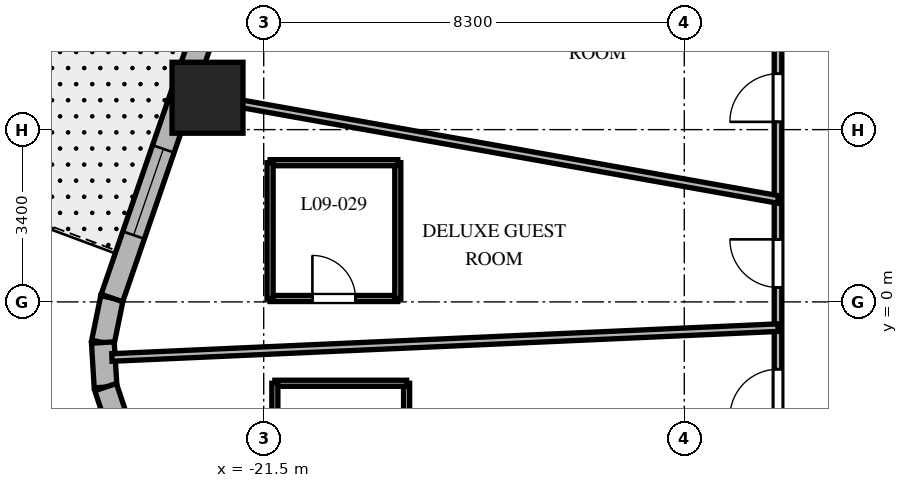
"""IFC4 building model, lengths in metres.
Left out: names, types, materials, properties, quantities, classifications, styles, units other than length and angle.
Written with IfcOpenShell. Run it as: python <this file> out.ifc"""

import sys

from ifc_helpers import new_model, si_unit, direction, frame, frame_2d, origin, origin_2d, place, context, subcontext, project, spatial, rectangle, extrude, element, fill, save


model = new_model("IFC4")
c1 = context("Model", 3, precision=1e-05, world=origin(), true_north=direction((0.0, 1.0)))
c2 = subcontext(c1, "Body", "Model", "MODEL_VIEW")
j1 = project(units=[si_unit("LENGTHUNIT", "METRE"), si_unit("PLANEANGLEUNIT", "RADIAN")], contexts=[c1])
p1 = place(None, origin())
s1 = spatial("IfcSite", under=j1, at=p1, CompositionType="ELEMENT")
p2 = place(p1, origin())
s2 = spatial("IfcBuilding", under=s1, at=p2, CompositionType="ELEMENT")
p3 = place(p2, frame((0.0, 0.0, 45.3)))
s3 = spatial("IfcBuildingStorey", under=s2, at=p3, CompositionType="ELEMENT", Elevation=45.3)
p4 = place(p3, frame((-22.609, 4.029, 0.0), z_axis=(0.0, 0.0, 1.0), x_axis=(1.0, 0.0, 0.0)))
e1 = element("IfcColumn", 1, at=p4, inside=s3, PredefinedType="COLUMN", context=c2, shape_type="SweptSolid", body=[
    extrude(rectangle(XDim=1.4, YDim=1.4, at=origin_2d()), origin(), (0.0, 0.0, 1.0), 3.7),
])
p5 = place(p3, frame((-24.496, 0.077, 0.0), z_axis=(0.0, 0.0, 1.0), x_axis=(-0.199570594521, -0.979883451132, 0.0)))
e2 = element("IfcWall", 2, at=p5, inside=s3, PredefinedType="SOLIDWALL", context=c2, shape_type="SweptSolid", body=[
    extrude(rectangle(XDim=0.897, YDim=0.45, at=frame_2d((0.448, 0.0))), origin(), (0.0, 0.0, 1.0), 3.4),
])
p6 = place(p3, frame((-24.675, -0.802, 0.0), z_axis=(0.0, 0.0, 1.0), x_axis=(0.061188874166, -0.998126205286, 0.0)))
e3 = element("IfcWall", 3, at=p6, inside=s3, PredefinedType="SOLIDWALL", context=c2, shape_type="SweptSolid", body=[
    extrude(rectangle(XDim=0.882, YDim=0.45, at=frame_2d((0.441, 0.0))), origin(), (0.0, 0.0, 1.0), 3.4),
])
p7 = place(p3, frame((-24.621, -1.682, 0.0), z_axis=(0.0, 0.0, 1.0), x_axis=(0.317697451681, -0.948192137278, 0.0)))
e4 = element("IfcWall", 4, at=p7, inside=s3, PredefinedType="SOLIDWALL", context=c2, shape_type="SweptSolid", body=[
    extrude(rectangle(XDim=0.897, YDim=0.45, at=frame_2d((0.448, 0.0))), origin(), (0.0, 0.0, 1.0), 3.4),
])
p8 = place(p3, frame((-17.39, 20.678, 0.0), z_axis=(0.0, 0.0, 1.0), x_axis=(-0.326068018294, -0.945346310854, 0.0)))
e5 = element("IfcWall", 5, at=p8, inside=s3, PredefinedType="SOLIDWALL", context=c2, shape_type="SweptSolid", body=[
    extrude(rectangle(XDim=21.793, YDim=0.45, at=frame_2d((10.896, 0.0))), origin(), (0.0, 0.0, 1.0), 3.4),
])
p9 = place(p8, frame((5.493, 0.0, 0.0)))
e6 = element("IfcOpeningElement", 6, at=p9, cuts=e5, PredefinedType="OPENING", context=c2, shape_type="SweptSolid", body=[
    extrude(rectangle(XDim=1.0, YDim=2.15, at=frame_2d((0.5, 1.075))), frame((0.0, 0.235, 0.0), z_axis=(0.0, -1.0, 0.0), x_axis=(1.0, 0.0, 0.0)), (0.0, 0.0, 1.0), 0.47),
])
p10 = place(p8, frame((1.26, 0.0, 0.8)))
e7 = element("IfcOpeningElement", 7, at=p10, cuts=e5, PredefinedType="OPENING", context=c2, shape_type="SweptSolid", body=[
    extrude(rectangle(XDim=1.8, YDim=1.8, at=frame_2d((0.9, 0.9))), frame((0.0, 0.235, 0.0), z_axis=(0.0, -1.0, 0.0), x_axis=(1.0, 0.0, 0.0)), (0.0, 0.0, 1.0), 0.47),
])
p11 = place(p8, frame((7.283, 0.0, 0.8)))
e8 = element("IfcOpeningElement", 8, at=p11, cuts=e5, PredefinedType="OPENING", context=c2, shape_type="SweptSolid", body=[
    extrude(rectangle(XDim=1.8, YDim=1.8, at=frame_2d((0.9, 0.9))), frame((0.0, 0.235, 0.0), z_axis=(0.0, -1.0, 0.0), x_axis=(1.0, 0.0, 0.0)), (0.0, 0.0, 1.0), 0.47),
])
p12 = place(p8, frame((12.736, 0.0, 0.8)))
e9 = element("IfcOpeningElement", 9, at=p12, cuts=e5, PredefinedType="OPENING", context=c2, shape_type="SweptSolid", body=[
    extrude(rectangle(XDim=1.8, YDim=1.8, at=frame_2d((0.9, 0.9))), frame((0.0, 0.235, 0.0), z_axis=(0.0, -1.0, 0.0), x_axis=(1.0, 0.0, 0.0)), (0.0, 0.0, 1.0), 0.47),
])
p13 = place(p8, frame((18.68, 0.0, 0.8)))
e10 = element("IfcOpeningElement", 10, at=p13, cuts=e5, PredefinedType="OPENING", context=c2, shape_type="SweptSolid", body=[
    extrude(rectangle(XDim=1.8, YDim=1.8, at=frame_2d((0.9, 0.9))), frame((0.0, 0.235, 0.0), z_axis=(0.0, -1.0, 0.0), x_axis=(1.0, 0.0, 0.0)), (0.0, 0.0, 1.0), 0.47),
])
p14 = place(p3, frame((-11.35, -9.85, 0.0), z_axis=(0.0, 0.0, 1.0), x_axis=(0.0, 1.0, 0.0)))
e11 = element("IfcWall", 11, at=p14, inside=s3, PredefinedType="PARTITIONING", context=c2, shape_type="SweptSolid", body=[
    extrude(rectangle(XDim=19.7, YDim=0.15, at=frame_2d((9.85, 0.0))), origin(), (0.0, 0.0, 1.0), 2.84),
])
p15 = place(p14, frame((17.181, 0.0, 0.0)))
e12 = element("IfcOpeningElement", 12, at=p15, cuts=e11, PredefinedType="OPENING", context=c2, shape_type="SweptSolid", body=[
    extrude(rectangle(XDim=0.95, YDim=2.03, at=frame_2d((0.475, 1.015))), frame((0.0, 0.085, 0.0), z_axis=(0.0, -1.0, 0.0), x_axis=(1.0, 0.0, 0.0)), (0.0, 0.0, 1.0), 0.17),
])
p16 = place(p14, frame((13.403, 0.0, 0.0)))
e13 = element("IfcOpeningElement", 13, at=p16, cuts=e11, PredefinedType="OPENING", context=c2, shape_type="SweptSolid", body=[
    extrude(rectangle(XDim=0.95, YDim=2.03, at=frame_2d((0.475, 1.015))), frame((0.0, 0.085, 0.0), z_axis=(0.0, -1.0, 0.0), x_axis=(1.0, 0.0, 0.0)), (0.0, 0.0, 1.0), 0.17),
])
p17 = place(p14, frame((10.134, 0.0, 0.0)))
e14 = element("IfcOpeningElement", 14, at=p17, cuts=e11, PredefinedType="OPENING", context=c2, shape_type="SweptSolid", body=[
    extrude(rectangle(XDim=0.95, YDim=2.03, at=frame_2d((0.475, 1.015))), frame((0.0, 0.085, 0.0), z_axis=(0.0, -1.0, 0.0), x_axis=(1.0, 0.0, 0.0)), (0.0, 0.0, 1.0), 0.17),
])
p18 = place(p14, frame((7.571, 0.0, 0.0)))
e15 = element("IfcOpeningElement", 15, at=p18, cuts=e11, PredefinedType="OPENING", context=c2, shape_type="SweptSolid", body=[
    extrude(rectangle(XDim=0.95, YDim=2.03, at=frame_2d((0.475, 1.015))), frame((0.0, 0.085, 0.0), z_axis=(0.0, -1.0, 0.0), x_axis=(1.0, 0.0, 0.0)), (0.0, 0.0, 1.0), 0.17),
])
p19 = place(p14, frame((3.024, 0.0, 0.0)))
e16 = element("IfcOpeningElement", 16, at=p19, cuts=e11, PredefinedType="OPENING", context=c2, shape_type="SweptSolid", body=[
    extrude(rectangle(XDim=0.95, YDim=2.03, at=frame_2d((0.475, 1.015))), frame((0.0, 0.085, 0.0), z_axis=(0.0, -1.0, 0.0), x_axis=(1.0, 0.0, 0.0)), (0.0, 0.0, 1.0), 0.17),
])
p20 = place(p3, frame((-11.35, 2.023, 0.0), z_axis=(0.0, 0.0, 1.0), x_axis=(-0.984493741877, 0.17541970301, 0.0)))
e17 = element("IfcWall", 17, at=p20, inside=s3, PredefinedType="PARTITIONING", context=c2, shape_type="SweptSolid", body=[
    extrude(rectangle(XDim=11.937, YDim=0.15, at=frame_2d((5.969, 0.0))), origin(), (0.0, 0.0, 1.0), 2.54),
])
p21 = place(p3, frame((-11.35, -0.508, 0.0), z_axis=(0.0, 0.0, 1.0), x_axis=(-0.998998237556, -0.044749540337, 0.0)))
e18 = element("IfcWall", 18, at=p21, inside=s3, PredefinedType="PARTITIONING", context=c2, shape_type="SweptSolid", body=[
    extrude(rectangle(XDim=13.159, YDim=0.15, at=frame_2d((6.58, 0.0))), origin(), (0.0, 0.0, 1.0), 2.54),
])
p22 = place(p3, frame((-21.374, 0.067, 0.0), z_axis=(0.0, 0.0, 1.0), x_axis=(1.0, 0.0, 0.0)))
e19 = element("IfcWall", 19, at=p22, inside=s3, PredefinedType="PARTITIONING", context=c2, shape_type="SweptSolid", body=[
    extrude(rectangle(XDim=2.52, YDim=0.12, at=frame_2d((1.26, 0.0))), origin(), (0.0, 0.0, 1.0), 3.4),
])
p23 = place(p22, frame((0.835, 0.0, 0.0)))
e20 = element("IfcOpeningElement", 20, at=p23, cuts=e19, PredefinedType="OPENING", context=c2, shape_type="SweptSolid", body=[
    extrude(rectangle(XDim=0.85, YDim=2.03, at=frame_2d((0.425, 1.015))), frame((0.0, 0.07, 0.0), z_axis=(0.0, -1.0, 0.0), x_axis=(1.0, 0.0, 0.0)), (0.0, 0.0, 1.0), 0.14),
])
p24 = place(p3, frame((-18.854, 0.067, 0.0), z_axis=(0.0, 0.0, 1.0), x_axis=(0.0, 1.0, 0.0)))
e21 = element("IfcWall", 21, at=p24, inside=s3, PredefinedType="PARTITIONING", context=c2, shape_type="SweptSolid", body=[
    extrude(rectangle(XDim=2.68, YDim=0.12, at=frame_2d((1.34, 0.0))), origin(), (0.0, 0.0, 1.0), 3.4),
])
p25 = place(p3, frame((-18.854, 2.747, 0.0), z_axis=(0.0, 0.0, 1.0), x_axis=(-1.0, 0.0, 0.0)))
e22 = element("IfcWall", 22, at=p25, inside=s3, PredefinedType="PARTITIONING", context=c2, shape_type="SweptSolid", body=[
    extrude(rectangle(XDim=2.52, YDim=0.12, at=frame_2d((1.26, 0.0))), origin(), (0.0, 0.0, 1.0), 3.4),
])
p26 = place(p3, frame((-21.374, 2.747, 0.0), z_axis=(0.0, 0.0, 1.0), x_axis=(0.0, -1.0, 0.0)))
e23 = element("IfcWall", 23, at=p26, inside=s3, PredefinedType="PARTITIONING", context=c2, shape_type="SweptSolid", body=[
    extrude(rectangle(XDim=2.68, YDim=0.12, at=frame_2d((1.34, 0.0))), origin(), (0.0, 0.0, 1.0), 3.4),
])
p27 = place(p3, frame((-18.68, -4.356, 0.0), z_axis=(0.0, 0.0, 1.0), x_axis=(0.0, 1.0, 0.0)))
e24 = element("IfcWall", 24, at=p27, inside=s3, PredefinedType="PARTITIONING", context=c2, shape_type="SweptSolid", body=[
    extrude(rectangle(XDim=2.75, YDim=0.12, at=frame_2d((1.375, 0.0))), origin(), (0.0, 0.0, 1.0), 3.4),
])
p28 = place(p3, frame((-18.68, -1.606, 0.0), z_axis=(0.0, 0.0, 1.0), x_axis=(-1.0, 0.0, 0.0)))
e25 = element("IfcWall", 25, at=p28, inside=s3, PredefinedType="PARTITIONING", context=c2, shape_type="SweptSolid", body=[
    extrude(rectangle(XDim=2.6, YDim=0.12, at=frame_2d((1.3, 0.0))), origin(), (0.0, 0.0, 1.0), 3.4),
])
p29 = place(p3, frame((-21.28, -1.606, 0.0), z_axis=(0.0, 0.0, 1.0), x_axis=(0.0, -1.0, 0.0)))
e26 = element("IfcWall", 26, at=p29, inside=s3, PredefinedType="PARTITIONING", context=c2, shape_type="SweptSolid", body=[
    extrude(rectangle(XDim=2.75, YDim=0.12, at=frame_2d((1.375, 0.0))), origin(), (0.0, 0.0, 1.0), 3.4),
])
p30 = place(p13, origin())
e27 = element("IfcWindow", 27, at=p30, inside=s3, PartitioningType="SINGLE_PANEL", PredefinedType="WINDOW", context=c2, shape_type="SweptSolid", body=[
    extrude(rectangle(XDim=1.8, YDim=1.8, at=frame_2d((0.9, 0.9))), frame((0.0, 0.03, 0.0), z_axis=(0.0, -1.0, 0.0), x_axis=(1.0, 0.0, 0.0)), (0.0, 0.0, 1.0), 0.06),
])
fill(e10, e27)
p31 = place(p16, origin())
e28 = element("IfcDoor", 28, at=p31, inside=s3, OperationType="SINGLE_SWING_LEFT", PredefinedType="DOOR", context=c2, shape_type="SweptSolid", body=[
    extrude(rectangle(XDim=0.95, YDim=2.03, at=frame_2d((0.475, 1.015))), frame((0.0, 0.025, 0.0), z_axis=(0.0, -1.0, 0.0), x_axis=(1.0, 0.0, 0.0)), (0.0, 0.0, 1.0), 0.05),
])
fill(e13, e28)
p32 = place(p17, origin())
e29 = element("IfcDoor", 29, at=p32, inside=s3, OperationType="SINGLE_SWING_RIGHT", PredefinedType="DOOR", context=c2, shape_type="SweptSolid", body=[
    extrude(rectangle(XDim=0.95, YDim=2.03, at=frame_2d((0.475, 1.015))), frame((0.0, 0.025, 0.0), z_axis=(0.0, -1.0, 0.0), x_axis=(1.0, 0.0, 0.0)), (0.0, 0.0, 1.0), 0.05),
])
fill(e14, e29)
p33 = place(p23, origin())
e30 = element("IfcDoor", 30, at=p33, inside=s3, OperationType="SINGLE_SWING_LEFT", PredefinedType="DOOR", context=c2, shape_type="SweptSolid", body=[
    extrude(rectangle(XDim=0.85, YDim=2.03, at=frame_2d((0.425, 1.015))), frame((0.0, 0.025, 0.0), z_axis=(0.0, -1.0, 0.0), x_axis=(1.0, 0.0, 0.0)), (0.0, 0.0, 1.0), 0.05),
])
fill(e20, e30)
p34 = place(p18, origin())
e31 = element("IfcDoor", 31, at=p34, inside=s3, OperationType="SINGLE_SWING_LEFT", PredefinedType="DOOR", context=c2, shape_type="SweptSolid", body=[
    extrude(rectangle(XDim=0.95, YDim=2.03, at=frame_2d((0.475, 1.015))), frame((0.0, 0.025, 0.0), z_axis=(0.0, -1.0, 0.0), x_axis=(1.0, 0.0, 0.0)), (0.0, 0.0, 1.0), 0.05),
])
fill(e15, e31)
save(model, sys.argv[1])
